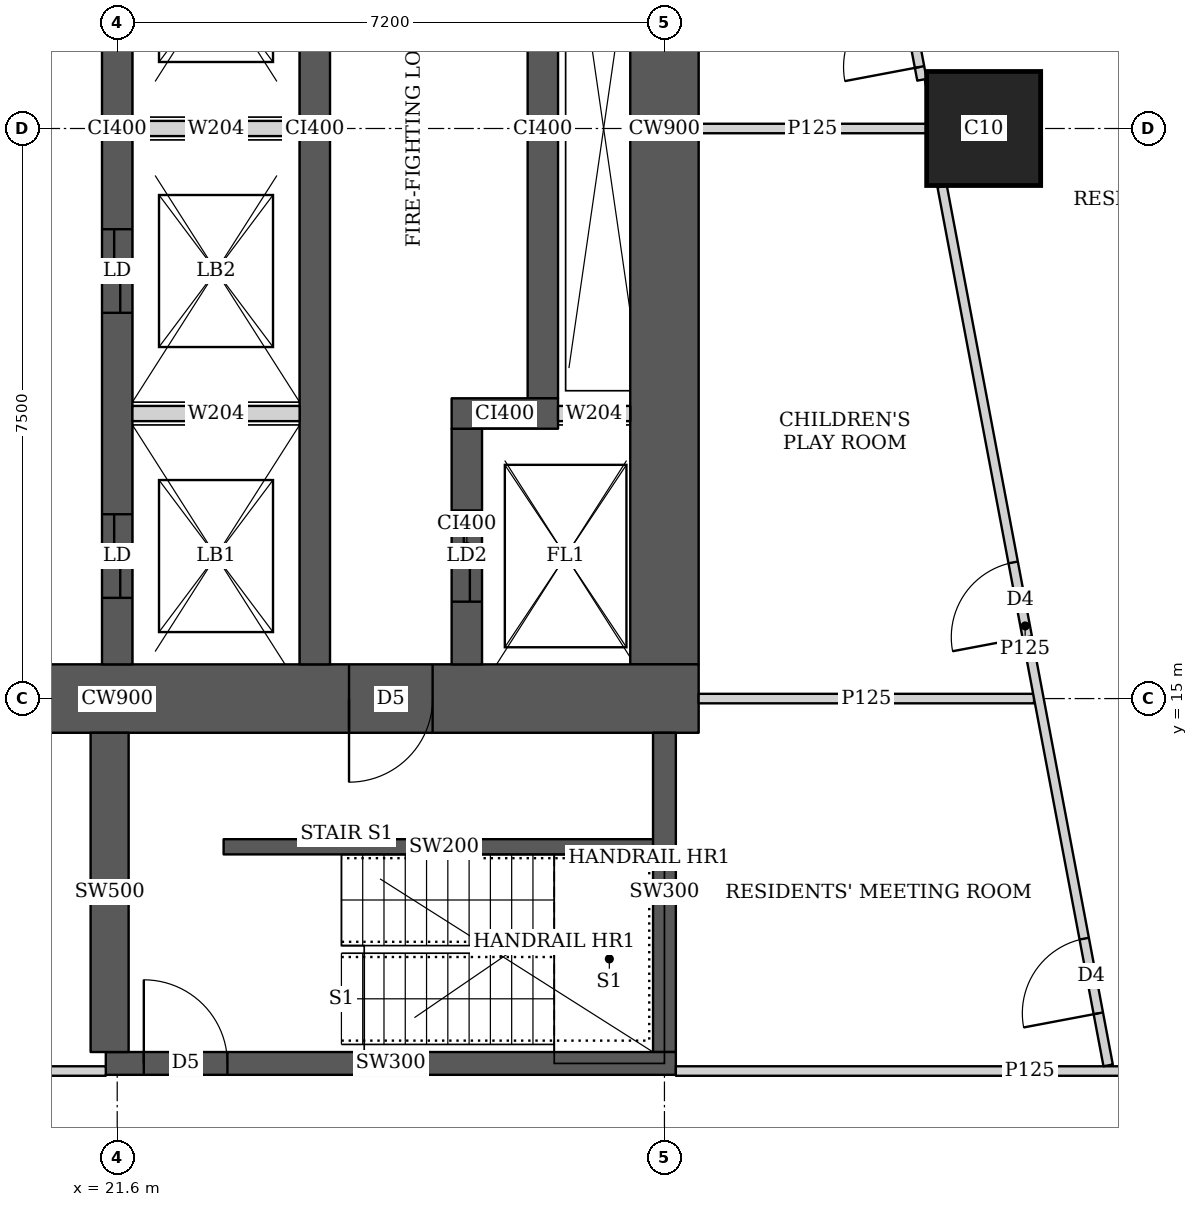
"""IFC4 building model, lengths in metres.
Left out: names, types, materials, properties, quantities, classifications, styles, units other than length and angle.
Written with IfcOpenShell. Run it as: python <this file> out.ifc"""

import sys

from ifc_helpers import new_model, si_unit, direction, frame, frame_2d, origin, origin_2d, place, context, subcontext, project, spatial, rectangle, extrude, element, fill, save


model = new_model("IFC4")
c1 = context("Model", 3, precision=1e-05, world=origin(), true_north=direction((0.0, 1.0)))
c2 = subcontext(c1, "Body", "Model", "MODEL_VIEW")
j1 = project(units=[si_unit("LENGTHUNIT", "METRE"), si_unit("PLANEANGLEUNIT", "RADIAN")], contexts=[c1])
p1 = place(None, origin())
s1 = spatial("IfcSite", under=j1, at=p1, CompositionType="ELEMENT")
p2 = place(p1, origin())
s2 = spatial("IfcBuilding", under=s1, at=p2, CompositionType="ELEMENT")
p3 = place(p2, frame((0.0, 0.0, 147.05)))
s3 = spatial("IfcBuildingStorey", under=s2, at=p3, CompositionType="ELEMENT", Elevation=147.05)
p4 = place(p3, frame((33.0, 22.5, 0.0), z_axis=(0.0, 0.0, 1.0), x_axis=(1.0, 0.0, 0.0)))
e1 = element("IfcColumn", 1, at=p4, inside=s3, PredefinedType="COLUMN", context=c2, shape_type="SweptSolid", body=[
    extrude(rectangle(XDim=1.5, YDim=1.5, at=origin_2d()), origin(), (0.0, 0.0, 1.0), 3.75),
])
p5 = place(p3, frame((13.95, 15.0, 0.0), z_axis=(0.0, 0.0, 1.0), x_axis=(1.0, 0.0, 0.0)))
e2 = element("IfcWall", 2, at=p5, inside=s3, PredefinedType="SHEAR", context=c2, shape_type="SweptSolid", body=[
    extrude(rectangle(XDim=15.3, YDim=0.9, at=frame_2d((7.65, 0.0))), origin(), (0.0, 0.0, 1.0), 3.75),
])
p6 = place(p5, frame((4.45, 0.0, 0.0)))
e3 = element("IfcOpeningElement", 3, at=p6, cuts=e2, PredefinedType="OPENING", context=c2, shape_type="SweptSolid", body=[
    extrude(rectangle(XDim=1.8, YDim=2.1, at=frame_2d((0.9, 1.05))), frame((0.0, 0.46, 0.0), z_axis=(0.0, -1.0, 0.0), x_axis=(1.0, 0.0, 0.0)), (0.0, 0.0, 1.0), 0.92),
])
p7 = place(p5, frame((10.7, 0.0, 0.0)))
e4 = element("IfcOpeningElement", 4, at=p7, cuts=e2, PredefinedType="OPENING", context=c2, shape_type="SweptSolid", body=[
    extrude(rectangle(XDim=1.1, YDim=2.1, at=frame_2d((0.55, 1.05))), frame((0.0, 0.46, 0.0), z_axis=(0.0, -1.0, 0.0), x_axis=(1.0, 0.0, 0.0)), (0.0, 0.0, 1.0), 0.92),
])
p8 = place(p3, frame((28.8, 15.45, 0.0), z_axis=(0.0, 0.0, 1.0), x_axis=(0.0, 1.0, 0.0)))
e5 = element("IfcWall", 5, at=p8, inside=s3, PredefinedType="SHEAR", context=c2, shape_type="SweptSolid", body=[
    extrude(rectangle(XDim=14.1, YDim=0.9, at=frame_2d((7.05, 0.0))), origin(), (0.0, 0.0, 1.0), 3.75),
])
p9 = place(p3, frame((21.6, 15.45, 0.0), z_axis=(0.0, 0.0, 1.0), x_axis=(0.0, 1.0, 0.0)))
e6 = element("IfcWall", 6, at=p9, inside=s3, PredefinedType="SHEAR", context=c2, shape_type="SweptSolid", body=[
    extrude(rectangle(XDim=14.1, YDim=0.4, at=frame_2d((7.05, 0.0))), origin(), (0.0, 0.0, 1.0), 3.75),
])
p10 = place(p9, frame((0.875, 0.0, 0.0)))
e7 = element("IfcOpeningElement", 7, at=p10, cuts=e6, PredefinedType="OPENING", context=c2, shape_type="SweptSolid", body=[
    extrude(rectangle(XDim=1.1, YDim=2.1, at=frame_2d((0.55, 1.05))), frame((0.0, 0.21, 0.0), z_axis=(0.0, -1.0, 0.0), x_axis=(1.0, 0.0, 0.0)), (0.0, 0.0, 1.0), 0.42),
])
p11 = place(p9, frame((4.625, 0.0, 0.0)))
e8 = element("IfcOpeningElement", 8, at=p11, cuts=e6, PredefinedType="OPENING", context=c2, shape_type="SweptSolid", body=[
    extrude(rectangle(XDim=1.1, YDim=2.1, at=frame_2d((0.55, 1.05))), frame((0.0, 0.21, 0.0), z_axis=(0.0, -1.0, 0.0), x_axis=(1.0, 0.0, 0.0)), (0.0, 0.0, 1.0), 0.42),
])
p12 = place(p9, frame((8.375, 0.0, 0.0)))
e9 = element("IfcOpeningElement", 9, at=p12, cuts=e6, PredefinedType="OPENING", context=c2, shape_type="SweptSolid", body=[
    extrude(rectangle(XDim=1.1, YDim=2.1, at=frame_2d((0.55, 1.05))), frame((0.0, 0.21, 0.0), z_axis=(0.0, -1.0, 0.0), x_axis=(1.0, 0.0, 0.0)), (0.0, 0.0, 1.0), 0.42),
])
p13 = place(p9, frame((12.125, 0.0, 0.0)))
e10 = element("IfcOpeningElement", 10, at=p13, cuts=e6, PredefinedType="OPENING", context=c2, shape_type="SweptSolid", body=[
    extrude(rectangle(XDim=1.1, YDim=2.1, at=frame_2d((0.55, 1.05))), frame((0.0, 0.21, 0.0), z_axis=(0.0, -1.0, 0.0), x_axis=(1.0, 0.0, 0.0)), (0.0, 0.0, 1.0), 0.42),
])
p14 = place(p3, frame((24.2, 15.45, 0.0), z_axis=(0.0, 0.0, 1.0), x_axis=(0.0, 1.0, 0.0)))
e11 = element("IfcWall", 11, at=p14, inside=s3, PredefinedType="SHEAR", context=c2, shape_type="SweptSolid", body=[
    extrude(rectangle(XDim=14.1, YDim=0.4, at=frame_2d((7.05, 0.0))), origin(), (0.0, 0.0, 1.0), 3.75),
])
p15 = place(p3, frame((26.2, 15.45, 0.0), z_axis=(0.0, 0.0, 1.0), x_axis=(0.0, 1.0, 0.0)))
e12 = element("IfcWall", 12, at=p15, inside=s3, PredefinedType="SHEAR", context=c2, shape_type="SweptSolid", body=[
    extrude(rectangle(XDim=3.1, YDim=0.4, at=frame_2d((1.55, 0.0))), origin(), (0.0, 0.0, 1.0), 3.75),
])
p16 = place(p15, frame((0.825, 0.0, 0.0)))
e13 = element("IfcOpeningElement", 13, at=p16, cuts=e12, PredefinedType="OPENING", context=c2, shape_type="SweptSolid", body=[
    extrude(rectangle(XDim=1.2, YDim=2.1, at=frame_2d((0.6, 1.05))), frame((0.0, 0.21, 0.0), z_axis=(0.0, -1.0, 0.0), x_axis=(1.0, 0.0, 0.0)), (0.0, 0.0, 1.0), 0.42),
])
p17 = place(p3, frame((26.0, 18.75, 0.0), z_axis=(0.0, 0.0, 1.0), x_axis=(1.0, 0.0, 0.0)))
e14 = element("IfcWall", 14, at=p17, inside=s3, PredefinedType="SHEAR", context=c2, shape_type="SweptSolid", body=[
    extrude(rectangle(XDim=1.4, YDim=0.4, at=frame_2d((0.7, 0.0))), origin(), (0.0, 0.0, 1.0), 3.75),
])
p18 = place(p3, frame((27.2, 18.95, 0.0), z_axis=(0.0, 0.0, 1.0), x_axis=(0.0, 1.0, 0.0)))
e15 = element("IfcWall", 15, at=p18, inside=s3, PredefinedType="SHEAR", context=c2, shape_type="SweptSolid", body=[
    extrude(rectangle(XDim=7.1, YDim=0.4, at=frame_2d((3.55, 0.0))), origin(), (0.0, 0.0, 1.0), 3.75),
])
p19 = place(p3, frame((21.45, 10.2, 0.0), z_axis=(0.0, 0.0, 1.0), x_axis=(1.0, 0.0, 0.0)))
e16 = element("IfcWall", 16, at=p19, inside=s3, PredefinedType="SHEAR", context=c2, shape_type="SweptSolid", body=[
    extrude(rectangle(XDim=7.5, YDim=0.3, at=frame_2d((3.75, 0.0))), origin(), (0.0, 0.0, 1.0), 3.75),
])
p20 = place(p19, frame((0.5, 0.0, 0.0)))
e17 = element("IfcOpeningElement", 17, at=p20, cuts=e16, PredefinedType="OPENING", context=c2, shape_type="SweptSolid", body=[
    extrude(rectangle(XDim=1.1, YDim=2.1, at=frame_2d((0.55, 1.05))), frame((0.0, 0.16, 0.0), z_axis=(0.0, -1.0, 0.0), x_axis=(1.0, 0.0, 0.0)), (0.0, 0.0, 1.0), 0.32),
])
p21 = place(p3, frame((21.5, 10.35, 0.0), z_axis=(0.0, 0.0, 1.0), x_axis=(0.0, 1.0, 0.0)))
e18 = element("IfcWall", 18, at=p21, inside=s3, PredefinedType="SHEAR", context=c2, shape_type="SweptSolid", body=[
    extrude(rectangle(XDim=4.2, YDim=0.5, at=frame_2d((2.1, 0.0))), origin(), (0.0, 0.0, 1.0), 3.75),
])
p22 = place(p3, frame((28.8, 10.35, 0.0), z_axis=(0.0, 0.0, 1.0), x_axis=(0.0, 1.0, 0.0)))
e19 = element("IfcWall", 19, at=p22, inside=s3, PredefinedType="SHEAR", context=c2, shape_type="SweptSolid", body=[
    extrude(rectangle(XDim=4.2, YDim=0.3, at=frame_2d((2.1, 0.0))), origin(), (0.0, 0.0, 1.0), 3.75),
])
p23 = place(p3, frame((33.877, 43.029, 0.0), z_axis=(0.0, 0.0, 1.0), x_axis=(0.185596841028, -0.98262597798, 0.0)))
e20 = element("IfcWall", 20, at=p23, inside=s3, PredefinedType="SOLIDWALL", context=c2, shape_type="SweptSolid", body=[
    extrude(rectangle(XDim=41.66, YDim=0.15, at=frame_2d((20.83, 0.0))), origin(), (0.0, 0.0, 1.0), 2.5),
])
p24 = place(p23, frame((12.57, 0.0, 0.0)))
e21 = element("IfcOpeningElement", 21, at=p24, cuts=e20, PredefinedType="OPENING", context=c2, shape_type="SweptSolid", body=[
    extrude(rectangle(XDim=1.0, YDim=2.1, at=frame_2d((0.5, 1.05))), frame((0.0, 0.085, 0.0), z_axis=(0.0, -1.0, 0.0), x_axis=(1.0, 0.0, 0.0)), (0.0, 0.0, 1.0), 0.17),
])
p25 = place(p23, frame((16.386, 0.0, 0.0)))
e22 = element("IfcOpeningElement", 22, at=p25, cuts=e20, PredefinedType="OPENING", context=c2, shape_type="SweptSolid", body=[
    extrude(rectangle(XDim=1.0, YDim=2.1, at=frame_2d((0.5, 1.05))), frame((0.0, 0.085, 0.0), z_axis=(0.0, -1.0, 0.0), x_axis=(1.0, 0.0, 0.0)), (0.0, 0.0, 1.0), 0.17),
])
p26 = place(p23, frame((31.166, 0.0, 0.0)))
e23 = element("IfcOpeningElement", 23, at=p26, cuts=e20, PredefinedType="OPENING", context=c2, shape_type="SweptSolid", body=[
    extrude(rectangle(XDim=1.0, YDim=2.1, at=frame_2d((0.5, 1.05))), frame((0.0, 0.085, 0.0), z_axis=(0.0, -1.0, 0.0), x_axis=(1.0, 0.0, 0.0)), (0.0, 0.0, 1.0), 0.17),
])
p27 = place(p3, frame((10.162, 10.1, 0.0), z_axis=(0.0, 0.0, 1.0), x_axis=(1.0, 0.0, 0.0)))
e24 = element("IfcWall", 24, at=p27, inside=s3, PredefinedType="PARTITIONING", context=c2, shape_type="SweptSolid", body=[
    extrude(rectangle(XDim=11.288, YDim=0.125, at=frame_2d((5.644, 0.0))), origin(), (0.0, 0.0, 1.0), 3.5),
])
p28 = place(p27, frame((7.833, 0.0, 0.0)))
e25 = element("IfcOpeningElement", 25, at=p28, cuts=e24, PredefinedType="OPENING", context=c2, shape_type="SweptSolid", body=[
    extrude(rectangle(XDim=1.8, YDim=2.1, at=frame_2d((0.9, 1.05))), frame((0.0, 0.073, 0.0), z_axis=(0.0, -1.0, 0.0), x_axis=(1.0, 0.0, 0.0)), (0.0, 0.0, 1.0), 0.145),
])
p29 = place(p3, frame((28.95, 10.1, 0.0), z_axis=(0.0, 0.0, 1.0), x_axis=(1.0, 0.0, 0.0)))
e26 = element("IfcWall", 26, at=p29, inside=s3, PredefinedType="PARTITIONING", context=c2, shape_type="SweptSolid", body=[
    extrude(rectangle(XDim=9.315, YDim=0.125, at=frame_2d((4.657, 0.0))), origin(), (0.0, 0.0, 1.0), 3.5),
])
p30 = place(p3, frame((34.638, 10.174, 0.0), z_axis=(0.0, 0.0, 1.0), x_axis=(-0.185583626094, 0.982628473903, 0.0)))
e27 = element("IfcWall", 27, at=p30, inside=s3, PredefinedType="PARTITIONING", context=c2, shape_type="SweptSolid", body=[
    extrude(rectangle(XDim=11.767, YDim=0.125, at=frame_2d((5.884, 0.0))), origin(), (0.0, 0.0, 1.0), 3.5),
])
p31 = place(p30, frame((0.697, 0.0, 0.0)))
e28 = element("IfcOpeningElement", 28, at=p31, cuts=e27, PredefinedType="OPENING", context=c2, shape_type="SweptSolid", body=[
    extrude(rectangle(XDim=1.0, YDim=2.1, at=frame_2d((0.5, 1.05))), frame((0.0, 0.073, 0.0), z_axis=(0.0, -1.0, 0.0), x_axis=(1.0, 0.0, 0.0)), (0.0, 0.0, 1.0), 0.145),
])
p32 = place(p30, frame((5.734, 0.0, 0.0)))
e29 = element("IfcOpeningElement", 29, at=p32, cuts=e27, PredefinedType="OPENING", context=c2, shape_type="SweptSolid", body=[
    extrude(rectangle(XDim=1.0, YDim=2.1, at=frame_2d((0.5, 1.05))), frame((0.0, 0.073, 0.0), z_axis=(0.0, -1.0, 0.0), x_axis=(1.0, 0.0, 0.0)), (0.0, 0.0, 1.0), 0.145),
])
p33 = place(p3, frame((32.188, 23.141, 0.0), z_axis=(0.0, 0.0, 1.0), x_axis=(-0.185598625075, 0.98262564101, 0.0)))
e30 = element("IfcWall", 30, at=p33, inside=s3, PredefinedType="PARTITIONING", context=c2, shape_type="SweptSolid", body=[
    extrude(rectangle(XDim=11.891, YDim=0.125, at=frame_2d((5.946, 0.0))), origin(), (0.0, 0.0, 1.0), 3.5),
])
p34 = place(p33, frame((0.171, 0.0, 0.0)))
e31 = element("IfcOpeningElement", 31, at=p34, cuts=e30, PredefinedType="OPENING", context=c2, shape_type="SweptSolid", body=[
    extrude(rectangle(XDim=1.0, YDim=2.1, at=frame_2d((0.5, 1.05))), frame((0.0, 0.073, 0.0), z_axis=(0.0, -1.0, 0.0), x_axis=(1.0, 0.0, 0.0)), (0.0, 0.0, 1.0), 0.145),
])
p35 = place(p33, frame((3.987, 0.0, 0.0)))
e32 = element("IfcOpeningElement", 32, at=p35, cuts=e30, PredefinedType="OPENING", context=c2, shape_type="SweptSolid", body=[
    extrude(rectangle(XDim=1.0, YDim=2.1, at=frame_2d((0.5, 1.05))), frame((0.0, 0.073, 0.0), z_axis=(0.0, -1.0, 0.0), x_axis=(1.0, 0.0, 0.0)), (0.0, 0.0, 1.0), 0.145),
])
p36 = place(p33, frame((7.803, 0.0, 0.0)))
e33 = element("IfcOpeningElement", 33, at=p36, cuts=e30, PredefinedType="OPENING", context=c2, shape_type="SweptSolid", body=[
    extrude(rectangle(XDim=1.0, YDim=2.1, at=frame_2d((0.5, 1.05))), frame((0.0, 0.073, 0.0), z_axis=(0.0, -1.0, 0.0), x_axis=(1.0, 0.0, 0.0)), (0.0, 0.0, 1.0), 0.145),
])
p37 = place(p3, frame((29.25, 15.0, 0.0), z_axis=(0.0, 0.0, 1.0), x_axis=(1.0, 0.0, 0.0)))
e34 = element("IfcWall", 34, at=p37, inside=s3, PredefinedType="PARTITIONING", context=c2, shape_type="SweptSolid", body=[
    extrude(rectangle(XDim=4.413, YDim=0.125, at=frame_2d((2.207, 0.0))), origin(), (0.0, 0.0, 1.0), 3.5),
])
p38 = place(p3, frame((29.25, 22.5, 0.0), z_axis=(0.0, 0.0, 1.0), x_axis=(1.0, 0.0, 0.0)))
e35 = element("IfcWall", 35, at=p38, inside=s3, PredefinedType="PARTITIONING", context=c2, shape_type="SweptSolid", body=[
    extrude(rectangle(XDim=2.996, YDim=0.125, at=frame_2d((1.498, 0.0))), origin(), (0.0, 0.0, 1.0), 3.5),
])
p39 = place(p3, frame((23.0, 13.05, 0.0), z_axis=(0.0, 0.0, 1.0), x_axis=(1.0, 0.0, 0.0)))
e36 = element("IfcWall", 36, at=p39, inside=s3, PredefinedType="SHEAR", context=c2, shape_type="SweptSolid", body=[
    extrude(rectangle(XDim=5.8, YDim=0.2, at=frame_2d((2.9, 0.0))), origin(), (0.0, 0.0, 1.0), 3.75),
])
for number, where, z_axis, x_axis in (
    (37, (21.8, 18.75, 0.0), (0.0, 0.0, 1.0), (1.0, 0.0, 0.0)),
    (38, (21.8, 22.5, 0.0), (0.0, 0.0, 1.0), (1.0, 0.0, 0.0)),
):
    element("IfcWall", number, at=place(p3, frame(where, z_axis=z_axis, x_axis=x_axis)), inside=s3, PredefinedType="SOLIDWALL", context=c2, shape_type="SweptSolid", body=[
        extrude(rectangle(XDim=2.2, YDim=0.2, at=frame_2d((1.1, 0.0))), origin(), (0.0, 0.0, 1.0), 3.5),
    ])
p40 = place(p3, frame((27.4, 18.75, 0.0), z_axis=(0.0, 0.0, 1.0), x_axis=(1.0, 0.0, 0.0)))
e39 = element("IfcWall", 39, at=p40, inside=s3, PredefinedType="SOLIDWALL", context=c2, shape_type="SweptSolid", body=[
    extrude(rectangle(XDim=0.95, YDim=0.2, at=frame_2d((0.475, 0.0))), origin(), (0.0, 0.0, 1.0), 3.5),
])
p41 = place(p31, origin())
e40 = element("IfcDoor", 40, at=p41, inside=s3, OperationType="SINGLE_SWING_LEFT", PredefinedType="DOOR", context=c2, shape_type="SweptSolid", body=[
    extrude(rectangle(XDim=1.0, YDim=2.1, at=frame_2d((0.5, 1.05))), frame((0.0, 0.025, 0.0), z_axis=(0.0, -1.0, 0.0), x_axis=(1.0, 0.0, 0.0)), (0.0, 0.0, 1.0), 0.05),
])
fill(e28, e40)
p42 = place(p32, origin())
e41 = element("IfcDoor", 41, at=p42, inside=s3, OperationType="SINGLE_SWING_LEFT", PredefinedType="DOOR", context=c2, shape_type="SweptSolid", body=[
    extrude(rectangle(XDim=1.0, YDim=2.1, at=frame_2d((0.5, 1.05))), frame((0.0, 0.025, 0.0), z_axis=(0.0, -1.0, 0.0), x_axis=(1.0, 0.0, 0.0)), (0.0, 0.0, 1.0), 0.05),
])
fill(e29, e41)
p43 = place(p34, origin())
e42 = element("IfcDoor", 42, at=p43, inside=s3, OperationType="SINGLE_SWING_LEFT", PredefinedType="DOOR", context=c2, shape_type="SweptSolid", body=[
    extrude(rectangle(XDim=1.0, YDim=2.1, at=frame_2d((0.5, 1.05))), frame((0.0, 0.025, 0.0), z_axis=(0.0, -1.0, 0.0), x_axis=(1.0, 0.0, 0.0)), (0.0, 0.0, 1.0), 0.05),
])
fill(e31, e42)
p44 = place(p7, origin())
e43 = element("IfcDoor", 43, at=p44, inside=s3, OperationType="SINGLE_SWING_RIGHT", PredefinedType="DOOR", context=c2, shape_type="SweptSolid", body=[
    extrude(rectangle(XDim=1.1, YDim=2.1, at=frame_2d((0.55, 1.05))), frame((0.0, 0.025, 0.0), z_axis=(0.0, -1.0, 0.0), x_axis=(1.0, 0.0, 0.0)), (0.0, 0.0, 1.0), 0.05),
])
fill(e4, e43)
p45 = place(p16, origin())
e44 = element("IfcDoor", 44, at=p45, inside=s3, OperationType="DOUBLE_DOOR_SLIDING", PredefinedType="DOOR", context=c2, shape_type="SweptSolid", body=[
    extrude(rectangle(XDim=1.2, YDim=2.1, at=frame_2d((0.6, 1.05))), frame((0.0, 0.025, 0.0), z_axis=(0.0, -1.0, 0.0), x_axis=(1.0, 0.0, 0.0)), (0.0, 0.0, 1.0), 0.05),
])
fill(e13, e44)
p46 = place(p10, origin())
e45 = element("IfcDoor", 45, at=p46, inside=s3, OperationType="DOUBLE_DOOR_SLIDING", PredefinedType="DOOR", context=c2, shape_type="SweptSolid", body=[
    extrude(rectangle(XDim=1.1, YDim=2.1, at=frame_2d((0.55, 1.05))), frame((0.0, 0.025, 0.0), z_axis=(0.0, -1.0, 0.0), x_axis=(1.0, 0.0, 0.0)), (0.0, 0.0, 1.0), 0.05),
])
fill(e7, e45)
p47 = place(p11, origin())
e46 = element("IfcDoor", 46, at=p47, inside=s3, OperationType="DOUBLE_DOOR_SLIDING", PredefinedType="DOOR", context=c2, shape_type="SweptSolid", body=[
    extrude(rectangle(XDim=1.1, YDim=2.1, at=frame_2d((0.55, 1.05))), frame((0.0, 0.025, 0.0), z_axis=(0.0, -1.0, 0.0), x_axis=(1.0, 0.0, 0.0)), (0.0, 0.0, 1.0), 0.05),
])
fill(e8, e46)
p48 = place(p20, origin())
e47 = element("IfcDoor", 47, at=p48, inside=s3, OperationType="SINGLE_SWING_LEFT", PredefinedType="DOOR", context=c2, shape_type="SweptSolid", body=[
    extrude(rectangle(XDim=1.1, YDim=2.1, at=frame_2d((0.55, 1.05))), frame((0.0, 0.025, 0.0), z_axis=(0.0, -1.0, 0.0), x_axis=(1.0, 0.0, 0.0)), (0.0, 0.0, 1.0), 0.05),
])
fill(e17, e47)
save(model, sys.argv[1])
